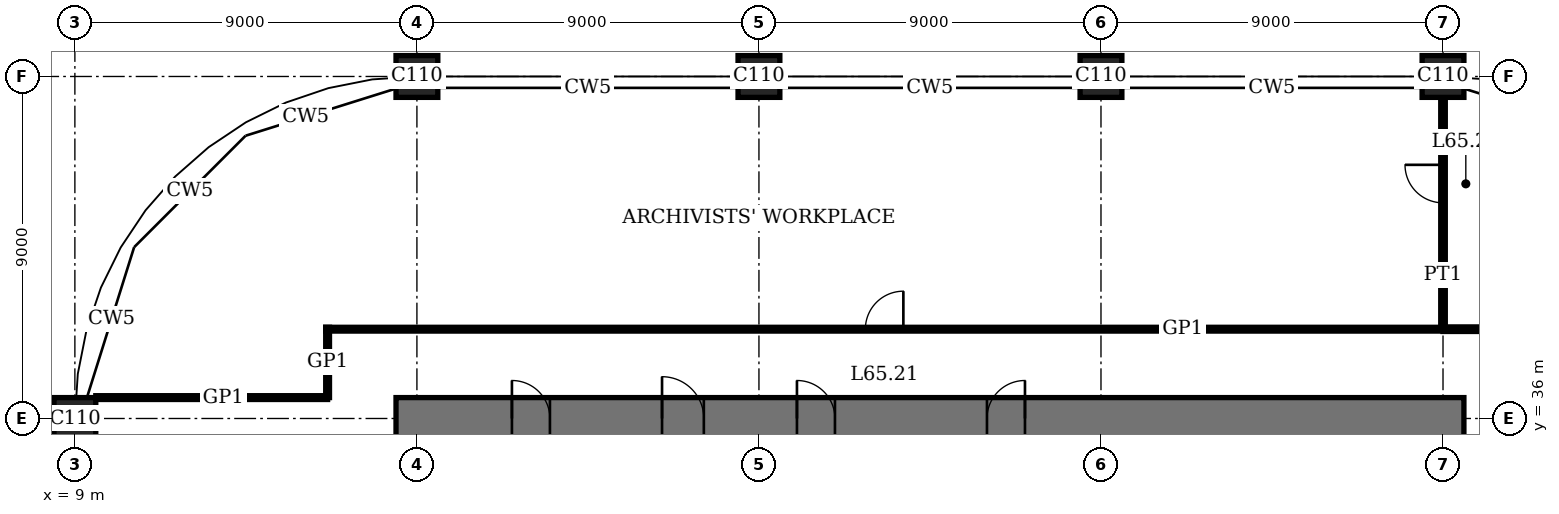
"""IFC4 building model, lengths in metres.
Left out: names, types, materials, properties, quantities, classifications, styles, units other than length and angle.
Written with IfcOpenShell. Run it as: python <this file> out.ifc"""

import sys

from ifc_helpers import new_model, si_unit, direction, frame, frame_2d, origin, origin_2d, place, context, subcontext, project, spatial, rectangle, extrude, element, fill, save


model = new_model("IFC4")
c1 = context("Model", 3, precision=1e-05, world=origin(), true_north=direction((0.0, 1.0)))
c2 = subcontext(c1, "Body", "Model", "MODEL_VIEW")
j1 = project(units=[si_unit("LENGTHUNIT", "METRE"), si_unit("PLANEANGLEUNIT", "RADIAN")], contexts=[c1])
p1 = place(None, origin())
s1 = spatial("IfcSite", under=j1, at=p1, CompositionType="ELEMENT")
p2 = place(p1, origin())
s2 = spatial("IfcBuilding", under=s1, at=p2, CompositionType="ELEMENT")
p3 = place(p2, frame((0.0, 0.0, 267.4)))
s3 = spatial("IfcBuildingStorey", under=s2, at=p3, CompositionType="ELEMENT", Elevation=267.4)
for number, where, z_axis, x_axis in (
    (1, (9.0, 36.0, 0.0), (0.0, 0.0, 1.0), (1.0, 0.0, 0.0)),
    (2, (18.0, 45.0, 0.0), (0.0, 0.0, 1.0), (1.0, 0.0, 0.0)),
    (3, (27.0, 45.0, 0.0), (0.0, 0.0, 1.0), (1.0, 0.0, 0.0)),
    (4, (36.0, 45.0, 0.0), (0.0, 0.0, 1.0), (1.0, 0.0, 0.0)),
    (5, (45.0, 45.0, 0.0), (0.0, 0.0, 1.0), (1.0, 0.0, 0.0)),
):
    element("IfcColumn", number, at=place(p3, frame(where, z_axis=z_axis, x_axis=x_axis)), inside=s3, PredefinedType="COLUMN", context=c2, shape_type="SweptSolid", body=[
        extrude(rectangle(XDim=1.1, YDim=1.1, at=origin_2d()), origin(), (0.0, 0.0, 1.0), 4.0),
    ])
p4 = place(p3, frame((45.55, 36.0, 0.0), z_axis=(0.0, 0.0, 1.0), x_axis=(-1.0, 0.0, 0.0)))
e6 = element("IfcWall", 6, at=p4, inside=s3, PredefinedType="SHEAR", context=c2, shape_type="SweptSolid", body=[
    extrude(rectangle(XDim=28.1, YDim=1.1, at=frame_2d((14.05, 0.0))), origin(), (0.0, 0.0, 1.0), 4.0),
])
p5 = place(p4, frame((11.55, 0.0, 0.0)))
e7 = element("IfcOpeningElement", 7, at=p5, cuts=e6, PredefinedType="OPENING", context=c2, shape_type="SweptSolid", body=[
    extrude(rectangle(XDim=1.0, YDim=2.4, at=frame_2d((0.5, 1.2))), frame((0.0, 0.56, 0.0), z_axis=(0.0, -1.0, 0.0), x_axis=(1.0, 0.0, 0.0)), (0.0, 0.0, 1.0), 1.12),
])
p6 = place(p4, frame((16.55, 0.0, 0.0)))
e8 = element("IfcOpeningElement", 8, at=p6, cuts=e6, PredefinedType="OPENING", context=c2, shape_type="SweptSolid", body=[
    extrude(rectangle(XDim=1.0, YDim=2.4, at=frame_2d((0.5, 1.2))), frame((0.0, 0.56, 0.0), z_axis=(0.0, -1.0, 0.0), x_axis=(1.0, 0.0, 0.0)), (0.0, 0.0, 1.0), 1.12),
])
p7 = place(p4, frame((20.0, 0.0, 0.0)))
e9 = element("IfcOpeningElement", 9, at=p7, cuts=e6, PredefinedType="OPENING", context=c2, shape_type="SweptSolid", body=[
    extrude(rectangle(XDim=1.1, YDim=2.4, at=frame_2d((0.55, 1.2))), frame((0.0, 0.56, 0.0), z_axis=(0.0, -1.0, 0.0), x_axis=(1.0, 0.0, 0.0)), (0.0, 0.0, 1.0), 1.12),
])
p8 = place(p4, frame((24.05, 0.0, 0.0)))
e10 = element("IfcOpeningElement", 10, at=p8, cuts=e6, PredefinedType="OPENING", context=c2, shape_type="SweptSolid", body=[
    extrude(rectangle(XDim=1.0, YDim=2.4, at=frame_2d((0.5, 1.2))), frame((0.0, 0.56, 0.0), z_axis=(0.0, -1.0, 0.0), x_axis=(1.0, 0.0, 0.0)), (0.0, 0.0, 1.0), 1.12),
])
p9 = place(p3, frame((9.55, 36.55, 0.0), z_axis=(0.0, 0.0, 1.0), x_axis=(1.0, 0.0, 0.0)))
e11 = element("IfcWall", 11, at=p9, inside=s3, PredefinedType="PARTITIONING", context=c2, shape_type="SweptSolid", body=[
    extrude(rectangle(XDim=6.1, YDim=0.1, at=frame_2d((3.05, 0.0))), origin(), (0.0, 0.0, 1.0), 3.75),
])
p10 = place(p3, frame((45.0, 38.35, 0.0), z_axis=(0.0, 0.0, 1.0), x_axis=(1.0, 0.0, 0.0)))
e12 = element("IfcWall", 12, at=p10, inside=s3, PredefinedType="PARTITIONING", context=c2, shape_type="SweptSolid", body=[
    extrude(rectangle(XDim=8.082, YDim=0.12, at=frame_2d((4.041, 0.0))), origin(), (0.0, 0.0, 1.0), 3.75),
])
p11 = place(p3, frame((15.6, 38.35, 0.0), z_axis=(0.0, 0.0, 1.0), x_axis=(1.0, 0.0, 0.0)))
e13 = element("IfcWall", 13, at=p11, inside=s3, PredefinedType="PARTITIONING", context=c2, shape_type="SweptSolid", body=[
    extrude(rectangle(XDim=29.4, YDim=0.1, at=frame_2d((14.7, 0.0))), origin(), (0.0, 0.0, 1.0), 3.75),
])
p12 = place(p11, frame((14.2, 0.0, 0.0)))
e14 = element("IfcOpeningElement", 14, at=p12, cuts=e13, PredefinedType="OPENING", context=c2, shape_type="SweptSolid", body=[
    extrude(rectangle(XDim=1.0, YDim=2.4, at=frame_2d((0.5, 1.2))), frame((0.0, 0.06, 0.0), z_axis=(0.0, -1.0, 0.0), x_axis=(1.0, 0.0, 0.0)), (0.0, 0.0, 1.0), 0.12),
])
p13 = place(p3, frame((15.65, 36.55, 0.0), z_axis=(0.0, 0.0, 1.0), x_axis=(0.0, 1.0, 0.0)))
e15 = element("IfcWall", 15, at=p13, inside=s3, PredefinedType="PARTITIONING", context=c2, shape_type="SweptSolid", body=[
    extrude(rectangle(XDim=1.85, YDim=0.1, at=frame_2d((0.925, 0.0))), origin(), (0.0, 0.0, 1.0), 3.75),
])
p14 = place(p3, frame((45.0, 38.35, 0.0), z_axis=(0.0, 0.0, 1.0), x_axis=(0.0, 1.0, 0.0)))
e16 = element("IfcWall", 16, at=p14, inside=s3, PredefinedType="PARTITIONING", context=c2, shape_type="SweptSolid", body=[
    extrude(rectangle(XDim=6.1, YDim=0.12, at=frame_2d((3.05, 0.0))), origin(), (0.0, 0.0, 1.0), 3.05),
])
p15 = place(p14, frame((3.325, 0.0, 0.0)))
e17 = element("IfcOpeningElement", 17, at=p15, cuts=e16, PredefinedType="OPENING", context=c2, shape_type="SweptSolid", body=[
    extrude(rectangle(XDim=1.0, YDim=2.4, at=frame_2d((0.5, 1.2))), frame((0.0, 0.07, 0.0), z_axis=(0.0, -1.0, 0.0), x_axis=(1.0, 0.0, 0.0)), (0.0, 0.0, 1.0), 0.14),
])
p16 = place(p5, origin())
e18 = element("IfcDoor", 18, at=p16, inside=s3, OperationType="SINGLE_SWING_LEFT", PredefinedType="DOOR", context=c2, shape_type="SweptSolid", body=[
    extrude(rectangle(XDim=1.0, YDim=2.4, at=frame_2d((0.5, 1.2))), frame((0.0, 0.025, 0.0), z_axis=(0.0, -1.0, 0.0), x_axis=(1.0, 0.0, 0.0)), (0.0, 0.0, 1.0), 0.05),
    extrude(rectangle(XDim=0.04, YDim=2.4, at=frame_2d((0.02, 1.2))), frame((0.0, 0.4, 0.0), z_axis=(0.0, -1.0, 0.0), x_axis=(1.0, 0.0, 0.0)), (0.0, 0.0, 1.0), 0.8),
    extrude(rectangle(XDim=0.04, YDim=2.4, at=frame_2d((0.98, 1.2))), frame((0.0, 0.4, 0.0), z_axis=(0.0, -1.0, 0.0), x_axis=(1.0, 0.0, 0.0)), (0.0, 0.0, 1.0), 0.8),
    extrude(rectangle(XDim=1.0, YDim=0.04, at=frame_2d((0.5, 2.38))), frame((0.0, 0.4, 0.0), z_axis=(0.0, -1.0, 0.0), x_axis=(1.0, 0.0, 0.0)), (0.0, 0.0, 1.0), 0.8),
])
fill(e7, e18)
p17 = place(p6, origin())
e19 = element("IfcDoor", 19, at=p17, inside=s3, OperationType="SINGLE_SWING_RIGHT", PredefinedType="DOOR", context=c2, shape_type="SweptSolid", body=[
    extrude(rectangle(XDim=1.0, YDim=2.4, at=frame_2d((0.5, 1.2))), frame((0.0, 0.025, 0.0), z_axis=(0.0, -1.0, 0.0), x_axis=(1.0, 0.0, 0.0)), (0.0, 0.0, 1.0), 0.05),
    extrude(rectangle(XDim=0.04, YDim=2.4, at=frame_2d((0.02, 1.2))), frame((0.0, 0.4, 0.0), z_axis=(0.0, -1.0, 0.0), x_axis=(1.0, 0.0, 0.0)), (0.0, 0.0, 1.0), 0.8),
    extrude(rectangle(XDim=0.04, YDim=2.4, at=frame_2d((0.98, 1.2))), frame((0.0, 0.4, 0.0), z_axis=(0.0, -1.0, 0.0), x_axis=(1.0, 0.0, 0.0)), (0.0, 0.0, 1.0), 0.8),
    extrude(rectangle(XDim=1.0, YDim=0.04, at=frame_2d((0.5, 2.38))), frame((0.0, 0.4, 0.0), z_axis=(0.0, -1.0, 0.0), x_axis=(1.0, 0.0, 0.0)), (0.0, 0.0, 1.0), 0.8),
])
fill(e8, e19)
p18 = place(p7, origin())
e20 = element("IfcDoor", 20, at=p18, inside=s3, OperationType="SINGLE_SWING_RIGHT", PredefinedType="DOOR", context=c2, shape_type="SweptSolid", body=[
    extrude(rectangle(XDim=1.1, YDim=2.4, at=frame_2d((0.55, 1.2))), frame((0.0, 0.025, 0.0), z_axis=(0.0, -1.0, 0.0), x_axis=(1.0, 0.0, 0.0)), (0.0, 0.0, 1.0), 0.05),
    extrude(rectangle(XDim=0.04, YDim=2.4, at=frame_2d((0.02, 1.2))), frame((0.0, 0.44, 0.0), z_axis=(0.0, -1.0, 0.0), x_axis=(1.0, 0.0, 0.0)), (0.0, 0.0, 1.0), 0.88),
    extrude(rectangle(XDim=0.04, YDim=2.4, at=frame_2d((1.08, 1.2))), frame((0.0, 0.44, 0.0), z_axis=(0.0, -1.0, 0.0), x_axis=(1.0, 0.0, 0.0)), (0.0, 0.0, 1.0), 0.88),
    extrude(rectangle(XDim=1.1, YDim=0.04, at=frame_2d((0.55, 2.38))), frame((0.0, 0.44, 0.0), z_axis=(0.0, -1.0, 0.0), x_axis=(1.0, 0.0, 0.0)), (0.0, 0.0, 1.0), 0.88),
])
fill(e9, e20)
p19 = place(p8, origin())
e21 = element("IfcDoor", 21, at=p19, inside=s3, OperationType="SINGLE_SWING_RIGHT", PredefinedType="DOOR", context=c2, shape_type="SweptSolid", body=[
    extrude(rectangle(XDim=1.0, YDim=2.4, at=frame_2d((0.5, 1.2))), frame((0.0, 0.025, 0.0), z_axis=(0.0, -1.0, 0.0), x_axis=(1.0, 0.0, 0.0)), (0.0, 0.0, 1.0), 0.05),
    extrude(rectangle(XDim=0.04, YDim=2.4, at=frame_2d((0.02, 1.2))), frame((0.0, 0.4, 0.0), z_axis=(0.0, -1.0, 0.0), x_axis=(1.0, 0.0, 0.0)), (0.0, 0.0, 1.0), 0.8),
    extrude(rectangle(XDim=0.04, YDim=2.4, at=frame_2d((0.98, 1.2))), frame((0.0, 0.4, 0.0), z_axis=(0.0, -1.0, 0.0), x_axis=(1.0, 0.0, 0.0)), (0.0, 0.0, 1.0), 0.8),
    extrude(rectangle(XDim=1.0, YDim=0.04, at=frame_2d((0.5, 2.38))), frame((0.0, 0.4, 0.0), z_axis=(0.0, -1.0, 0.0), x_axis=(1.0, 0.0, 0.0)), (0.0, 0.0, 1.0), 0.8),
])
fill(e10, e21)
p20 = place(p12, origin())
e22 = element("IfcDoor", 22, at=p20, inside=s3, OperationType="SINGLE_SWING_LEFT", PredefinedType="DOOR", context=c2, shape_type="SweptSolid", body=[
    extrude(rectangle(XDim=1.0, YDim=2.4, at=frame_2d((0.5, 1.2))), frame((0.0, 0.02, 0.0), z_axis=(0.0, -1.0, 0.0), x_axis=(1.0, 0.0, 0.0)), (0.0, 0.0, 1.0), 0.04),
])
fill(e14, e22)
p21 = place(p15, origin())
e23 = element("IfcDoor", 23, at=p21, inside=s3, OperationType="SINGLE_SWING_LEFT", PredefinedType="DOOR", context=c2, shape_type="SweptSolid", body=[
    extrude(rectangle(XDim=1.0, YDim=2.4, at=frame_2d((0.5, 1.2))), frame((0.0, 0.025, 0.0), z_axis=(0.0, -1.0, 0.0), x_axis=(1.0, 0.0, 0.0)), (0.0, 0.0, 1.0), 0.05),
])
fill(e17, e23)
save(model, sys.argv[1])
